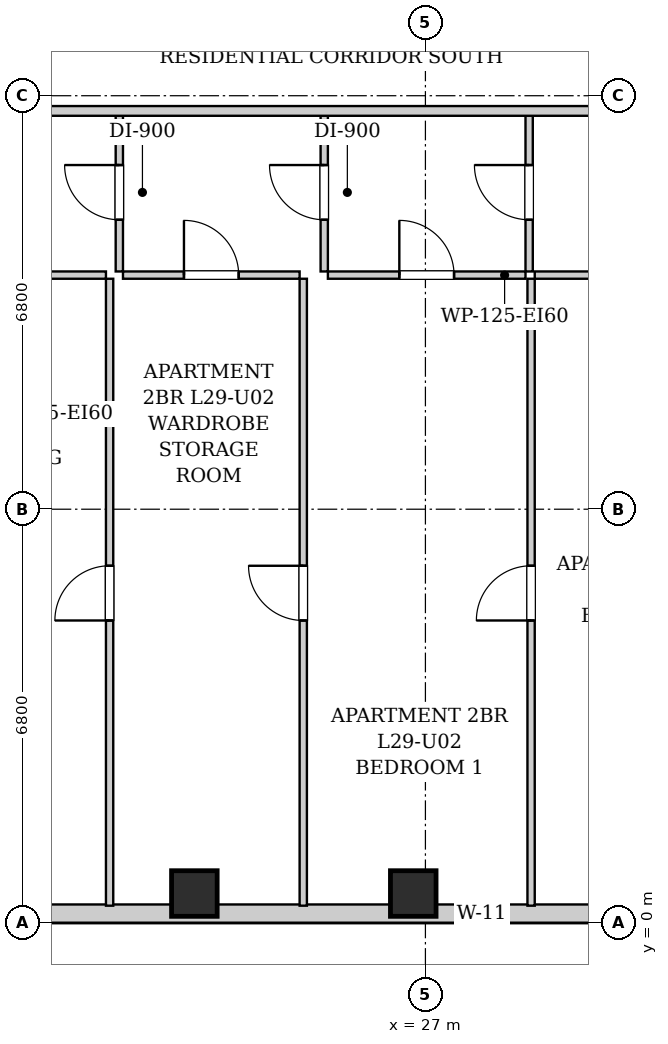
"""IFC4 building model, lengths in metres.
Left out: names, types, materials, properties, quantities, classifications, styles, units other than length and angle.
Written with IfcOpenShell. Run it as: python <this file> out.ifc"""

import sys

from ifc_helpers import new_model, si_unit, direction, frame, frame_2d, origin, origin_2d, place, context, subcontext, project, spatial, rectangle, extrude, element, fill, save


model = new_model("IFC4")
c1 = context("Model", 3, precision=1e-05, world=origin(), true_north=direction((0.0, 1.0)))
c2 = subcontext(c1, "Body", "Model", "MODEL_VIEW")
j1 = project(units=[si_unit("LENGTHUNIT", "METRE"), si_unit("PLANEANGLEUNIT", "RADIAN")], contexts=[c1])
p1 = place(None, origin())
s1 = spatial("IfcSite", under=j1, at=p1, CompositionType="ELEMENT")
p2 = place(p1, origin())
s2 = spatial("IfcBuilding", under=s1, at=p2, CompositionType="ELEMENT")
p3 = place(p2, frame((0.0, 0.0, 103.9)))
s3 = spatial("IfcBuildingStorey", under=s2, at=p3, CompositionType="ELEMENT", Elevation=103.9)
for number, where, z_axis, x_axis in (
    (1, (23.2, 0.48, 0.0), (0.0, 0.0, 1.0), (1.0, 0.0, 0.0)),
    (2, (26.8, 0.48, 0.0), (0.0, 0.0, 1.0), (1.0, 0.0, 0.0)),
):
    element("IfcColumn", number, at=place(p3, frame(where, z_axis=z_axis, x_axis=x_axis)), inside=s3, PredefinedType="COLUMN", context=c2, shape_type="SweptSolid", body=[
        extrude(rectangle(XDim=0.75, YDim=0.75, at=origin_2d()), origin(), (0.0, 0.0, 1.0), 3.2),
    ])
p4 = place(p3, frame((40.9, 0.15, 0.0), z_axis=(0.0, 0.0, 1.0), x_axis=(-1.0, 0.0, 0.0)))
e3 = element("IfcWall", 3, at=p4, inside=s3, PredefinedType="SOLIDWALL", context=c2, shape_type="SweptSolid", body=[
    extrude(rectangle(XDim=23.15, YDim=0.3, at=frame_2d((11.575, 0.0))), origin(), (0.0, 0.0, 1.0), 2.94),
])
p5 = place(p4, frame((20.296, 0.0, 0.55)))
e4 = element("IfcOpeningElement", 4, at=p5, cuts=e3, PredefinedType="OPENING", context=c2, shape_type="SweptSolid", body=[
    extrude(rectangle(XDim=1.35, YDim=1.2, at=frame_2d((0.675, 0.6))), frame((0.0, 0.16, 0.0), z_axis=(0.0, -1.0, 0.0), x_axis=(1.0, 0.0, 0.0)), (0.0, 0.0, 1.0), 0.32),
])
p6 = place(p4, frame((12.55, 0.0, 0.55)))
e5 = element("IfcOpeningElement", 5, at=p6, cuts=e3, PredefinedType="OPENING", context=c2, shape_type="SweptSolid", body=[
    extrude(rectangle(XDim=0.85, YDim=1.2, at=frame_2d((0.425, 0.6))), frame((0.0, 0.16, 0.0), z_axis=(0.0, -1.0, 0.0), x_axis=(1.0, 0.0, 0.0)), (0.0, 0.0, 1.0), 0.32),
])
p7 = place(p4, frame((9.622, 0.0, 0.55)))
e6 = element("IfcOpeningElement", 6, at=p7, cuts=e3, PredefinedType="OPENING", context=c2, shape_type="SweptSolid", body=[
    extrude(rectangle(XDim=1.35, YDim=1.2, at=frame_2d((0.675, 0.6))), frame((0.0, 0.16, 0.0), z_axis=(0.0, -1.0, 0.0), x_axis=(1.0, 0.0, 0.0)), (0.0, 0.0, 1.0), 0.32),
])
p8 = place(p4, frame((5.815, 0.0, 0.55)))
e7 = element("IfcOpeningElement", 7, at=p8, cuts=e3, PredefinedType="OPENING", context=c2, shape_type="SweptSolid", body=[
    extrude(rectangle(XDim=1.35, YDim=1.2, at=frame_2d((0.675, 0.6))), frame((0.0, 0.16, 0.0), z_axis=(0.0, -1.0, 0.0), x_axis=(1.0, 0.0, 0.0)), (0.0, 0.0, 1.0), 0.32),
])
p9 = place(p4, frame((2.106, 0.0, 0.55)))
e8 = element("IfcOpeningElement", 8, at=p9, cuts=e3, PredefinedType="OPENING", context=c2, shape_type="SweptSolid", body=[
    extrude(rectangle(XDim=1.35, YDim=1.2, at=frame_2d((0.675, 0.6))), frame((0.0, 0.16, 0.0), z_axis=(0.0, -1.0, 0.0), x_axis=(1.0, 0.0, 0.0)), (0.0, 0.0, 1.0), 0.32),
])
p10 = place(p3, frame((21.966, 10.71, 0.0), z_axis=(0.0, 0.0, 1.0), x_axis=(0.0, 1.0, 0.0)))
e9 = element("IfcWall", 9, at=p10, inside=s3, PredefinedType="PARTITIONING", context=c2, shape_type="SweptSolid", body=[
    extrude(rectangle(XDim=2.6, YDim=0.12, at=frame_2d((1.3, 0.0))), origin(), (0.0, 0.0, 1.0), 2.94),
])
p11 = place(p10, frame((0.85, 0.0, 0.0)))
e10 = element("IfcOpeningElement", 10, at=p11, cuts=e9, PredefinedType="OPENING", context=c2, shape_type="SweptSolid", body=[
    extrude(rectangle(XDim=0.9, YDim=2.05, at=frame_2d((0.45, 1.025))), frame((0.0, 0.07, 0.0), z_axis=(0.0, -1.0, 0.0), x_axis=(1.0, 0.0, 0.0)), (0.0, 0.0, 1.0), 0.14),
])
p12 = place(p3, frame((17.466, 10.65, 0.0), z_axis=(0.0, 0.0, 1.0), x_axis=(1.0, 0.0, 0.0)))
e11 = element("IfcWall", 11, at=p12, inside=s3, PredefinedType="PARTITIONING", context=c2, shape_type="SweptSolid", body=[
    extrude(rectangle(XDim=4.28, YDim=0.12, at=frame_2d((2.14, 0.0))), origin(), (0.0, 0.0, 1.0), 2.94),
])
p13 = place(p12, frame((1.69, 0.0, 0.0)))
e12 = element("IfcOpeningElement", 12, at=p13, cuts=e11, PredefinedType="OPENING", context=c2, shape_type="SweptSolid", body=[
    extrude(rectangle(XDim=0.9, YDim=2.05, at=frame_2d((0.45, 1.025))), frame((0.0, 0.07, 0.0), z_axis=(0.0, -1.0, 0.0), x_axis=(1.0, 0.0, 0.0)), (0.0, 0.0, 1.0), 0.14),
])
p14 = place(p3, frame((25.336, 10.71, 0.0), z_axis=(0.0, 0.0, 1.0), x_axis=(0.0, 1.0, 0.0)))
e13 = element("IfcWall", 13, at=p14, inside=s3, PredefinedType="PARTITIONING", context=c2, shape_type="SweptSolid", body=[
    extrude(rectangle(XDim=2.6, YDim=0.12, at=frame_2d((1.3, 0.0))), origin(), (0.0, 0.0, 1.0), 2.94),
])
p15 = place(p14, frame((0.85, 0.0, 0.0)))
e14 = element("IfcOpeningElement", 14, at=p15, cuts=e13, PredefinedType="OPENING", context=c2, shape_type="SweptSolid", body=[
    extrude(rectangle(XDim=0.9, YDim=2.05, at=frame_2d((0.45, 1.025))), frame((0.0, 0.07, 0.0), z_axis=(0.0, -1.0, 0.0), x_axis=(1.0, 0.0, 0.0)), (0.0, 0.0, 1.0), 0.14),
])
p16 = place(p3, frame((22.026, 10.65, 0.0), z_axis=(0.0, 0.0, 1.0), x_axis=(1.0, 0.0, 0.0)))
e15 = element("IfcWall", 15, at=p16, inside=s3, PredefinedType="PARTITIONING", context=c2, shape_type="SweptSolid", body=[
    extrude(rectangle(XDim=2.905, YDim=0.12, at=frame_2d((1.453, 0.0))), origin(), (0.0, 0.0, 1.0), 2.94),
])
p17 = place(p16, frame((1.003, 0.0, 0.0)))
e16 = element("IfcOpeningElement", 16, at=p17, cuts=e15, PredefinedType="OPENING", context=c2, shape_type="SweptSolid", body=[
    extrude(rectangle(XDim=0.9, YDim=2.05, at=frame_2d((0.45, 1.025))), frame((0.0, 0.07, 0.0), z_axis=(0.0, -1.0, 0.0), x_axis=(1.0, 0.0, 0.0)), (0.0, 0.0, 1.0), 0.14),
])
p18 = place(p3, frame((28.706, 10.71, 0.0), z_axis=(0.0, 0.0, 1.0), x_axis=(0.0, 1.0, 0.0)))
e17 = element("IfcWall", 17, at=p18, inside=s3, PredefinedType="PARTITIONING", context=c2, shape_type="SweptSolid", body=[
    extrude(rectangle(XDim=2.6, YDim=0.12, at=frame_2d((1.3, 0.0))), origin(), (0.0, 0.0, 1.0), 2.94),
])
p19 = place(p18, frame((0.85, 0.0, 0.0)))
e18 = element("IfcOpeningElement", 18, at=p19, cuts=e17, PredefinedType="OPENING", context=c2, shape_type="SweptSolid", body=[
    extrude(rectangle(XDim=0.9, YDim=2.05, at=frame_2d((0.45, 1.025))), frame((0.0, 0.07, 0.0), z_axis=(0.0, -1.0, 0.0), x_axis=(1.0, 0.0, 0.0)), (0.0, 0.0, 1.0), 0.14),
])
p20 = place(p3, frame((25.396, 10.65, 0.0), z_axis=(0.0, 0.0, 1.0), x_axis=(1.0, 0.0, 0.0)))
e19 = element("IfcWall", 19, at=p20, inside=s3, PredefinedType="PARTITIONING", context=c2, shape_type="SweptSolid", body=[
    extrude(rectangle(XDim=3.25, YDim=0.12, at=frame_2d((1.625, 0.0))), origin(), (0.0, 0.0, 1.0), 2.94),
])
p21 = place(p20, frame((1.175, 0.0, 0.0)))
e20 = element("IfcOpeningElement", 20, at=p21, cuts=e19, PredefinedType="OPENING", context=c2, shape_type="SweptSolid", body=[
    extrude(rectangle(XDim=0.9, YDim=2.05, at=frame_2d((0.45, 1.025))), frame((0.0, 0.07, 0.0), z_axis=(0.0, -1.0, 0.0), x_axis=(1.0, 0.0, 0.0)), (0.0, 0.0, 1.0), 0.14),
])
p22 = place(p3, frame((28.798, 10.65, 0.0), z_axis=(0.0, 0.0, 1.0), x_axis=(1.0, 0.0, 0.0)))
e21 = element("IfcWall", 21, at=p22, inside=s3, PredefinedType="PARTITIONING", context=c2, shape_type="SweptSolid", body=[
    extrude(rectangle(XDim=3.628, YDim=0.12, at=frame_2d((1.814, 0.0))), origin(), (0.0, 0.0, 1.0), 2.94),
])
p23 = place(p22, frame((1.364, 0.0, 0.0)))
e22 = element("IfcOpeningElement", 22, at=p23, cuts=e21, PredefinedType="OPENING", context=c2, shape_type="SweptSolid", body=[
    extrude(rectangle(XDim=0.9, YDim=2.05, at=frame_2d((0.45, 1.025))), frame((0.0, 0.07, 0.0), z_axis=(0.0, -1.0, 0.0), x_axis=(1.0, 0.0, 0.0)), (0.0, 0.0, 1.0), 0.14),
])
p24 = place(p3, frame((21.806, 0.28, 0.0), z_axis=(0.0, 0.0, 1.0), x_axis=(0.0, 1.0, 0.0)))
e23 = element("IfcWall", 23, at=p24, inside=s3, PredefinedType="PARTITIONING", context=c2, shape_type="SweptSolid", body=[
    extrude(rectangle(XDim=10.31, YDim=0.12, at=frame_2d((5.155, 0.0))), origin(), (0.0, 0.0, 1.0), 2.94),
])
p25 = place(p24, frame((4.69, 0.0, 0.0)))
e24 = element("IfcOpeningElement", 24, at=p25, cuts=e23, PredefinedType="OPENING", context=c2, shape_type="SweptSolid", body=[
    extrude(rectangle(XDim=0.9, YDim=2.05, at=frame_2d((0.45, 1.025))), frame((0.0, 0.07, 0.0), z_axis=(0.0, -1.0, 0.0), x_axis=(1.0, 0.0, 0.0)), (0.0, 0.0, 1.0), 0.14),
])
p26 = place(p3, frame((24.991, 0.28, 0.0), z_axis=(0.0, 0.0, 1.0), x_axis=(0.0, 1.0, 0.0)))
e25 = element("IfcWall", 25, at=p26, inside=s3, PredefinedType="PARTITIONING", context=c2, shape_type="SweptSolid", body=[
    extrude(rectangle(XDim=10.31, YDim=0.12, at=frame_2d((5.155, 0.0))), origin(), (0.0, 0.0, 1.0), 2.94),
])
p27 = place(p26, frame((4.69, 0.0, 0.0)))
e26 = element("IfcOpeningElement", 26, at=p27, cuts=e25, PredefinedType="OPENING", context=c2, shape_type="SweptSolid", body=[
    extrude(rectangle(XDim=0.9, YDim=2.05, at=frame_2d((0.45, 1.025))), frame((0.0, 0.07, 0.0), z_axis=(0.0, -1.0, 0.0), x_axis=(1.0, 0.0, 0.0)), (0.0, 0.0, 1.0), 0.14),
])
p28 = place(p3, frame((28.738, 0.28, 0.0), z_axis=(0.0, 0.0, 1.0), x_axis=(0.0, 1.0, 0.0)))
e27 = element("IfcWall", 27, at=p28, inside=s3, PredefinedType="PARTITIONING", context=c2, shape_type="SweptSolid", body=[
    extrude(rectangle(XDim=10.31, YDim=0.12, at=frame_2d((5.155, 0.0))), origin(), (0.0, 0.0, 1.0), 2.94),
])
p29 = place(p28, frame((4.69, 0.0, 0.0)))
e28 = element("IfcOpeningElement", 28, at=p29, cuts=e27, PredefinedType="OPENING", context=c2, shape_type="SweptSolid", body=[
    extrude(rectangle(XDim=0.9, YDim=2.05, at=frame_2d((0.45, 1.025))), frame((0.0, 0.07, 0.0), z_axis=(0.0, -1.0, 0.0), x_axis=(1.0, 0.0, 0.0)), (0.0, 0.0, 1.0), 0.14),
])
p30 = place(p3, frame((10.05, 13.35, 0.0), z_axis=(0.0, 0.0, 1.0), x_axis=(1.0, 0.0, 0.0)))
e29 = element("IfcWall", 29, at=p30, inside=s3, PredefinedType="PARTITIONING", context=c2, shape_type="SweptSolid", body=[
    extrude(rectangle(XDim=30.8, YDim=0.16, at=frame_2d((15.4, 0.0))), origin(), (0.0, 0.0, 1.0), 2.94),
])
p31 = place(p30, frame((2.893, 0.0, 0.0)))
e30 = element("IfcOpeningElement", 30, at=p31, cuts=e29, PredefinedType="OPENING", context=c2, shape_type="SweptSolid", body=[
    extrude(rectangle(XDim=0.95, YDim=2.1, at=frame_2d((0.475, 1.05))), frame((0.0, 0.09, 0.0), z_axis=(0.0, -1.0, 0.0), x_axis=(1.0, 0.0, 0.0)), (0.0, 0.0, 1.0), 0.18),
])
p32 = place(p30, frame((9.161, 0.0, 0.0)))
e31 = element("IfcOpeningElement", 31, at=p32, cuts=e29, PredefinedType="OPENING", context=c2, shape_type="SweptSolid", body=[
    extrude(rectangle(XDim=0.95, YDim=2.1, at=frame_2d((0.475, 1.05))), frame((0.0, 0.09, 0.0), z_axis=(0.0, -1.0, 0.0), x_axis=(1.0, 0.0, 0.0)), (0.0, 0.0, 1.0), 0.18),
])
p33 = place(p30, frame((26.306, 0.0, 0.0)))
e32 = element("IfcOpeningElement", 32, at=p33, cuts=e29, PredefinedType="OPENING", context=c2, shape_type="SweptSolid", body=[
    extrude(rectangle(XDim=0.95, YDim=2.1, at=frame_2d((0.475, 1.05))), frame((0.0, 0.09, 0.0), z_axis=(0.0, -1.0, 0.0), x_axis=(1.0, 0.0, 0.0)), (0.0, 0.0, 1.0), 0.18),
])
p34 = place(p11, origin())
e33 = element("IfcDoor", 33, at=p34, inside=s3, OperationType="SINGLE_SWING_RIGHT", PredefinedType="DOOR", context=c2, shape_type="SweptSolid", body=[
    extrude(rectangle(XDim=0.9, YDim=2.05, at=frame_2d((0.45, 1.025))), frame((0.0, 0.025, 0.0), z_axis=(0.0, -1.0, 0.0), x_axis=(1.0, 0.0, 0.0)), (0.0, 0.0, 1.0), 0.05),
])
fill(e10, e33)
p35 = place(p15, origin())
e34 = element("IfcDoor", 34, at=p35, inside=s3, OperationType="SINGLE_SWING_RIGHT", PredefinedType="DOOR", context=c2, shape_type="SweptSolid", body=[
    extrude(rectangle(XDim=0.9, YDim=2.05, at=frame_2d((0.45, 1.025))), frame((0.0, 0.025, 0.0), z_axis=(0.0, -1.0, 0.0), x_axis=(1.0, 0.0, 0.0)), (0.0, 0.0, 1.0), 0.05),
])
fill(e14, e34)
p36 = place(p17, origin())
e35 = element("IfcDoor", 35, at=p36, inside=s3, OperationType="SINGLE_SWING_LEFT", PredefinedType="DOOR", context=c2, shape_type="SweptSolid", body=[
    extrude(rectangle(XDim=0.9, YDim=2.05, at=frame_2d((0.45, 1.025))), frame((0.0, 0.025, 0.0), z_axis=(0.0, -1.0, 0.0), x_axis=(1.0, 0.0, 0.0)), (0.0, 0.0, 1.0), 0.05),
])
fill(e16, e35)
p37 = place(p19, origin())
e36 = element("IfcDoor", 36, at=p37, inside=s3, OperationType="SINGLE_SWING_RIGHT", PredefinedType="DOOR", context=c2, shape_type="SweptSolid", body=[
    extrude(rectangle(XDim=0.9, YDim=2.05, at=frame_2d((0.45, 1.025))), frame((0.0, 0.025, 0.0), z_axis=(0.0, -1.0, 0.0), x_axis=(1.0, 0.0, 0.0)), (0.0, 0.0, 1.0), 0.05),
])
fill(e18, e36)
p38 = place(p21, origin())
e37 = element("IfcDoor", 37, at=p38, inside=s3, OperationType="SINGLE_SWING_LEFT", PredefinedType="DOOR", context=c2, shape_type="SweptSolid", body=[
    extrude(rectangle(XDim=0.9, YDim=2.05, at=frame_2d((0.45, 1.025))), frame((0.0, 0.025, 0.0), z_axis=(0.0, -1.0, 0.0), x_axis=(1.0, 0.0, 0.0)), (0.0, 0.0, 1.0), 0.05),
])
fill(e20, e37)
p39 = place(p25, origin())
e38 = element("IfcDoor", 38, at=p39, inside=s3, OperationType="SINGLE_SWING_LEFT", PredefinedType="DOOR", context=c2, shape_type="SweptSolid", body=[
    extrude(rectangle(XDim=0.9, YDim=2.05, at=frame_2d((0.45, 1.025))), frame((0.0, 0.025, 0.0), z_axis=(0.0, -1.0, 0.0), x_axis=(1.0, 0.0, 0.0)), (0.0, 0.0, 1.0), 0.05),
])
fill(e24, e38)
p40 = place(p27, origin())
e39 = element("IfcDoor", 39, at=p40, inside=s3, OperationType="SINGLE_SWING_RIGHT", PredefinedType="DOOR", context=c2, shape_type="SweptSolid", body=[
    extrude(rectangle(XDim=0.9, YDim=2.05, at=frame_2d((0.45, 1.025))), frame((0.0, 0.025, 0.0), z_axis=(0.0, -1.0, 0.0), x_axis=(1.0, 0.0, 0.0)), (0.0, 0.0, 1.0), 0.05),
])
fill(e26, e39)
p41 = place(p29, origin())
e40 = element("IfcDoor", 40, at=p41, inside=s3, OperationType="SINGLE_SWING_LEFT", PredefinedType="DOOR", context=c2, shape_type="SweptSolid", body=[
    extrude(rectangle(XDim=0.9, YDim=2.05, at=frame_2d((0.45, 1.025))), frame((0.0, 0.025, 0.0), z_axis=(0.0, -1.0, 0.0), x_axis=(1.0, 0.0, 0.0)), (0.0, 0.0, 1.0), 0.05),
])
fill(e28, e40)
p42 = place(p6, origin())
e41 = element("IfcWindow", 41, at=p42, inside=s3, PartitioningType="SINGLE_PANEL", PredefinedType="WINDOW", context=c2, shape_type="SweptSolid", body=[
    extrude(rectangle(XDim=0.85, YDim=1.2, at=frame_2d((0.425, 0.6))), frame((0.0, 0.03, 0.0), z_axis=(0.0, -1.0, 0.0), x_axis=(1.0, 0.0, 0.0)), (0.0, 0.0, 1.0), 0.06),
])
fill(e5, e41)
save(model, sys.argv[1])
